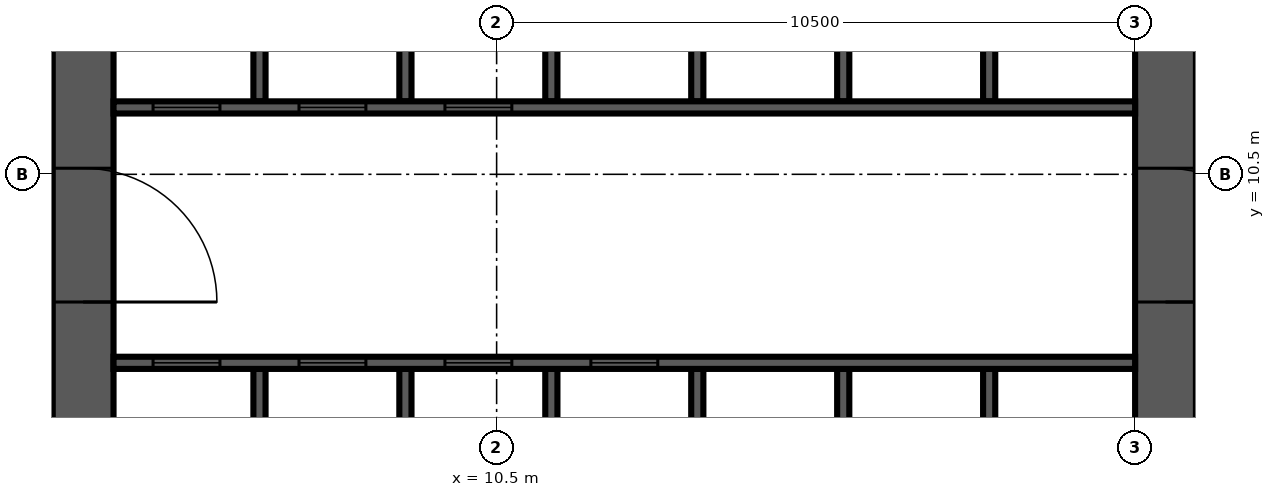
"""IFC4 building model, lengths in metres.
Left out: names, types, materials, properties, quantities, classifications, styles, units other than length and angle.
Written with IfcOpenShell. Run it as: python <this file> out.ifc"""

import sys

from ifc_helpers import new_model, si_unit, direction, frame, frame_2d, origin, place, context, subcontext, project, spatial, rectangle, extrude, source, transform, mapped, element, fill, save


model = new_model("IFC4")
c1 = context("Model", 3, precision=1e-05, world=origin(), true_north=direction((0.0, 1.0)))
c2 = subcontext(c1, "Body", "Model", "MODEL_VIEW")
j1 = project(units=[si_unit("LENGTHUNIT", "METRE"), si_unit("PLANEANGLEUNIT", "RADIAN")], contexts=[c1])
p1 = place(None, origin())
s1 = spatial("IfcSite", under=j1, at=p1, CompositionType="ELEMENT")
p2 = place(p1, origin())
s2 = spatial("IfcBuilding", under=s1, at=p2, CompositionType="ELEMENT")
p3 = place(p2, frame((0.0, 0.0, 107.7)))
s3 = spatial("IfcBuildingStorey", under=s2, at=p3, CompositionType="ELEMENT", Elevation=107.7)
m1 = source(origin(), c2, "Body", "SweptSolid", [
    extrude(rectangle(XDim=17.8, YDim=1.0, at=frame_2d((8.9, 0.0))), origin(), (0.0, 0.0, 1.0), 4.2),
])
p4 = place(p3, frame((3.7, 4.2, 0.0), z_axis=(0.0, 0.0, 1.0), x_axis=(0.0, 1.0, 0.0)))
e1 = element("IfcWall", 1, at=p4, inside=s3, PredefinedType="SHEAR", context=c2, shape_type="MappedRepresentation", body=[
    mapped(m1, transform((0.0, 0.0, 0.0), scale=1.0)),
])
m2 = source(origin(), c2, "Body", "SweptSolid", [
    extrude(rectangle(XDim=2.2, YDim=2.1, at=frame_2d((1.1, 1.05))), frame((0.0, 0.51, 0.0), z_axis=(0.0, -1.0, 0.0), x_axis=(1.0, 0.0, 0.0)), (0.0, 0.0, 1.0), 1.02),
])
p5 = place(p4, frame((4.2, 0.0, 0.0)))
e2 = element("IfcOpeningElement", 2, at=p5, cuts=e1, PredefinedType="OPENING", context=c2, shape_type="MappedRepresentation", body=[
    mapped(m2, transform((0.0, 0.0, 0.0), scale=1.0)),
])
m3 = source(origin(), c2, "Body", "SweptSolid", [
    extrude(rectangle(XDim=0.9, YDim=2.1, at=frame_2d((0.45, 1.05))), frame((0.0, 0.51, 0.0), z_axis=(0.0, -1.0, 0.0), x_axis=(1.0, 0.0, 0.0)), (0.0, 0.0, 1.0), 1.02),
])
p6 = place(p4, frame((10.95, 0.0, 0.0)))
e3 = element("IfcOpeningElement", 3, at=p6, cuts=e1, PredefinedType="OPENING", context=c2, shape_type="MappedRepresentation", body=[
    mapped(m3, transform((0.0, 0.0, 0.0), scale=1.0)),
])
m4 = source(origin(), c2, "Body", "SweptSolid", [
    extrude(rectangle(XDim=16.8, YDim=1.0, at=frame_2d((8.4, 0.0))), origin(), (0.0, 0.0, 1.0), 4.2),
])
p7 = place(p3, frame((21.5, 4.2, 0.0), z_axis=(0.0, 0.0, 1.0), x_axis=(0.0, 1.0, 0.0)))
e4 = element("IfcWall", 4, at=p7, inside=s3, PredefinedType="SHEAR", context=c2, shape_type="MappedRepresentation", body=[
    mapped(m4, transform((0.0, 0.0, 0.0), scale=1.0)),
])
p8 = place(p7, frame((4.2, 0.0, 0.0)))
e5 = element("IfcOpeningElement", 5, at=p8, cuts=e4, PredefinedType="OPENING", context=c2, shape_type="MappedRepresentation", body=[
    mapped(m2, transform((0.0, 0.0, 0.0), scale=1.0)),
])
m5 = source(origin(), c2, "Body", "SweptSolid", [
    extrude(rectangle(XDim=1.2, YDim=2.1, at=frame_2d((0.6, 1.05))), frame((0.0, 0.51, 0.0), z_axis=(0.0, -1.0, 0.0), x_axis=(1.0, 0.0, 0.0)), (0.0, 0.0, 1.0), 1.02),
])
p9 = place(p7, frame((14.7, 0.0, 0.0)))
e6 = element("IfcOpeningElement", 6, at=p9, cuts=e4, PredefinedType="OPENING", context=c2, shape_type="MappedRepresentation", body=[
    mapped(m5, transform((0.0, 0.0, 0.0), scale=1.0)),
])
m6 = source(origin(), c2, "Body", "SweptSolid", [
    extrude(rectangle(XDim=3.1, YDim=0.2, at=frame_2d((1.55, 0.0))), origin(), (0.0, 0.0, 1.0), 4.2),
])
for number, where, z_axis, x_axis in (
    (7, (6.6, 4.2, 0.0), (0.0, 0.0, 1.0), (0.0, 1.0, 0.0)),
    (8, (9.0, 4.2, 0.0), (0.0, 0.0, 1.0), (0.0, 1.0, 0.0)),
    (9, (11.4, 4.2, 0.0), (0.0, 0.0, 1.0), (0.0, 1.0, 0.0)),
    (10, (13.8, 4.2, 0.0), (0.0, 0.0, 1.0), (0.0, 1.0, 0.0)),
    (11, (16.2, 4.2, 0.0), (0.0, 0.0, 1.0), (0.0, 1.0, 0.0)),
    (12, (18.6, 4.2, 0.0), (0.0, 0.0, 1.0), (0.0, 1.0, 0.0)),
):
    element("IfcWall", number, at=place(p3, frame(where, z_axis=z_axis, x_axis=x_axis)), inside=s3, PredefinedType="SOLIDWALL", context=c2, shape_type="MappedRepresentation", body=[
        mapped(m6, transform((0.0, 0.0, 0.0), scale=1.0)),
    ])
m7 = source(origin(), c2, "Body", "SweptSolid", [
    extrude(rectangle(XDim=3.0, YDim=0.2, at=frame_2d((1.5, 0.0))), origin(), (0.0, 0.0, 1.0), 4.2),
])
for number, where, z_axis, x_axis in (
    (13, (6.6, 11.7, 0.0), (0.0, 0.0, 1.0), (0.0, 1.0, 0.0)),
    (14, (9.0, 11.7, 0.0), (0.0, 0.0, 1.0), (0.0, 1.0, 0.0)),
    (15, (11.4, 11.7, 0.0), (0.0, 0.0, 1.0), (0.0, 1.0, 0.0)),
    (16, (13.8, 11.7, 0.0), (0.0, 0.0, 1.0), (0.0, 1.0, 0.0)),
    (17, (16.2, 11.7, 0.0), (0.0, 0.0, 1.0), (0.0, 1.0, 0.0)),
    (18, (18.6, 11.7, 0.0), (0.0, 0.0, 1.0), (0.0, 1.0, 0.0)),
):
    element("IfcWall", number, at=place(p3, frame(where, z_axis=z_axis, x_axis=x_axis)), inside=s3, PredefinedType="SOLIDWALL", context=c2, shape_type="MappedRepresentation", body=[
        mapped(m7, transform((0.0, 0.0, 0.0), scale=1.0)),
    ])
m8 = source(origin(), c2, "Body", "SweptSolid", [
    extrude(rectangle(XDim=16.8, YDim=0.2, at=frame_2d((8.4, 0.0))), origin(), (0.0, 0.0, 1.0), 4.2),
])
p10 = place(p3, frame((4.2, 7.4, 0.0), z_axis=(0.0, 0.0, 1.0), x_axis=(1.0, 0.0, 0.0)))
e19 = element("IfcWall", 19, at=p10, inside=s3, PredefinedType="SOLIDWALL", context=c2, shape_type="MappedRepresentation", body=[
    mapped(m8, transform((0.0, 0.0, 0.0), scale=1.0)),
])
m9 = source(origin(), c2, "Body", "SweptSolid", [
    extrude(rectangle(XDim=1.1, YDim=2.1, at=frame_2d((0.55, 1.05))), frame((0.0, 0.11, 0.0), z_axis=(0.0, -1.0, 0.0), x_axis=(1.0, 0.0, 0.0)), (0.0, 0.0, 1.0), 0.22),
])
p11 = place(p10, frame((0.65, 0.0, 0.0)))
e20 = element("IfcOpeningElement", 20, at=p11, cuts=e19, PredefinedType="OPENING", context=c2, shape_type="MappedRepresentation", body=[
    mapped(m9, transform((0.0, 0.0, 0.0), scale=1.0)),
])
p12 = place(p10, frame((3.05, 0.0, 0.0)))
e21 = element("IfcOpeningElement", 21, at=p12, cuts=e19, PredefinedType="OPENING", context=c2, shape_type="MappedRepresentation", body=[
    mapped(m9, transform((0.0, 0.0, 0.0), scale=1.0)),
])
p13 = place(p10, frame((5.45, 0.0, 0.0)))
e22 = element("IfcOpeningElement", 22, at=p13, cuts=e19, PredefinedType="OPENING", context=c2, shape_type="MappedRepresentation", body=[
    mapped(m9, transform((0.0, 0.0, 0.0), scale=1.0)),
])
p14 = place(p10, frame((7.85, 0.0, 0.0)))
e23 = element("IfcOpeningElement", 23, at=p14, cuts=e19, PredefinedType="OPENING", context=c2, shape_type="MappedRepresentation", body=[
    mapped(m9, transform((0.0, 0.0, 0.0), scale=1.0)),
])
p15 = place(p3, frame((4.2, 11.6, 0.0), z_axis=(0.0, 0.0, 1.0), x_axis=(1.0, 0.0, 0.0)))
e24 = element("IfcWall", 24, at=p15, inside=s3, PredefinedType="SOLIDWALL", context=c2, shape_type="MappedRepresentation", body=[
    mapped(m8, transform((0.0, 0.0, 0.0), scale=1.0)),
])
p16 = place(p15, frame((0.65, 0.0, 0.0)))
e25 = element("IfcOpeningElement", 25, at=p16, cuts=e24, PredefinedType="OPENING", context=c2, shape_type="MappedRepresentation", body=[
    mapped(m9, transform((0.0, 0.0, 0.0), scale=1.0)),
])
p17 = place(p15, frame((3.05, 0.0, 0.0)))
e26 = element("IfcOpeningElement", 26, at=p17, cuts=e24, PredefinedType="OPENING", context=c2, shape_type="MappedRepresentation", body=[
    mapped(m9, transform((0.0, 0.0, 0.0), scale=1.0)),
])
p18 = place(p15, frame((5.45, 0.0, 0.0)))
e27 = element("IfcOpeningElement", 27, at=p18, cuts=e24, PredefinedType="OPENING", context=c2, shape_type="MappedRepresentation", body=[
    mapped(m9, transform((0.0, 0.0, 0.0), scale=1.0)),
])
m10 = source(origin(), c2, "Body", "SweptSolid", [
    extrude(rectangle(XDim=1.1, YDim=2.1, at=frame_2d((0.55, 1.05))), frame((0.0, 0.025, 0.0), z_axis=(0.0, -1.0, 0.0), x_axis=(1.0, 0.0, 0.0)), (0.0, 0.0, 1.0), 0.05),
])
p19 = place(p11, origin())
e28 = element("IfcDoor", 28, at=p19, inside=s3, OperationType="SLIDING_TO_LEFT", PredefinedType="DOOR", context=c2, shape_type="MappedRepresentation", body=[
    mapped(m10, transform((0.0, 0.0, 0.0), scale=1.0)),
])
fill(e20, e28)
p20 = place(p12, origin())
e29 = element("IfcDoor", 29, at=p20, inside=s3, OperationType="SLIDING_TO_LEFT", PredefinedType="DOOR", context=c2, shape_type="MappedRepresentation", body=[
    mapped(m10, transform((0.0, 0.0, 0.0), scale=1.0)),
])
fill(e21, e29)
p21 = place(p13, origin())
e30 = element("IfcDoor", 30, at=p21, inside=s3, OperationType="SLIDING_TO_LEFT", PredefinedType="DOOR", context=c2, shape_type="MappedRepresentation", body=[
    mapped(m10, transform((0.0, 0.0, 0.0), scale=1.0)),
])
fill(e22, e30)
p22 = place(p14, origin())
e31 = element("IfcDoor", 31, at=p22, inside=s3, OperationType="SLIDING_TO_LEFT", PredefinedType="DOOR", context=c2, shape_type="MappedRepresentation", body=[
    mapped(m10, transform((0.0, 0.0, 0.0), scale=1.0)),
])
fill(e23, e31)
p23 = place(p16, origin())
e32 = element("IfcDoor", 32, at=p23, inside=s3, OperationType="SLIDING_TO_LEFT", PredefinedType="DOOR", context=c2, shape_type="MappedRepresentation", body=[
    mapped(m10, transform((0.0, 0.0, 0.0), scale=1.0)),
])
fill(e25, e32)
p24 = place(p17, origin())
e33 = element("IfcDoor", 33, at=p24, inside=s3, OperationType="SLIDING_TO_LEFT", PredefinedType="DOOR", context=c2, shape_type="MappedRepresentation", body=[
    mapped(m10, transform((0.0, 0.0, 0.0), scale=1.0)),
])
fill(e26, e33)
p25 = place(p18, origin())
e34 = element("IfcDoor", 34, at=p25, inside=s3, OperationType="SLIDING_TO_LEFT", PredefinedType="DOOR", context=c2, shape_type="MappedRepresentation", body=[
    mapped(m10, transform((0.0, 0.0, 0.0), scale=1.0)),
])
fill(e27, e34)
m11 = source(origin(), c2, "Body", "SweptSolid", [
    extrude(rectangle(XDim=2.2, YDim=2.1, at=frame_2d((1.1, 1.05))), frame((0.0, 0.025, 0.0), z_axis=(0.0, -1.0, 0.0), x_axis=(1.0, 0.0, 0.0)), (0.0, 0.0, 1.0), 0.05),
])
p26 = place(p8, origin())
e35 = element("IfcDoor", 35, at=p26, inside=s3, OperationType="DOUBLE_DOOR_SINGLE_SWING", PredefinedType="DOOR", context=c2, shape_type="MappedRepresentation", body=[
    mapped(m11, transform((0.0, 0.0, 0.0), scale=1.0)),
])
fill(e5, e35)
p27 = place(p5, origin())
e36 = element("IfcDoor", 36, at=p27, inside=s3, OperationType="DOUBLE_DOOR_SINGLE_SWING", PredefinedType="DOOR", context=c2, shape_type="MappedRepresentation", body=[
    mapped(m11, transform((0.0, 0.0, 0.0), scale=1.0)),
])
fill(e2, e36)
save(model, sys.argv[1])
